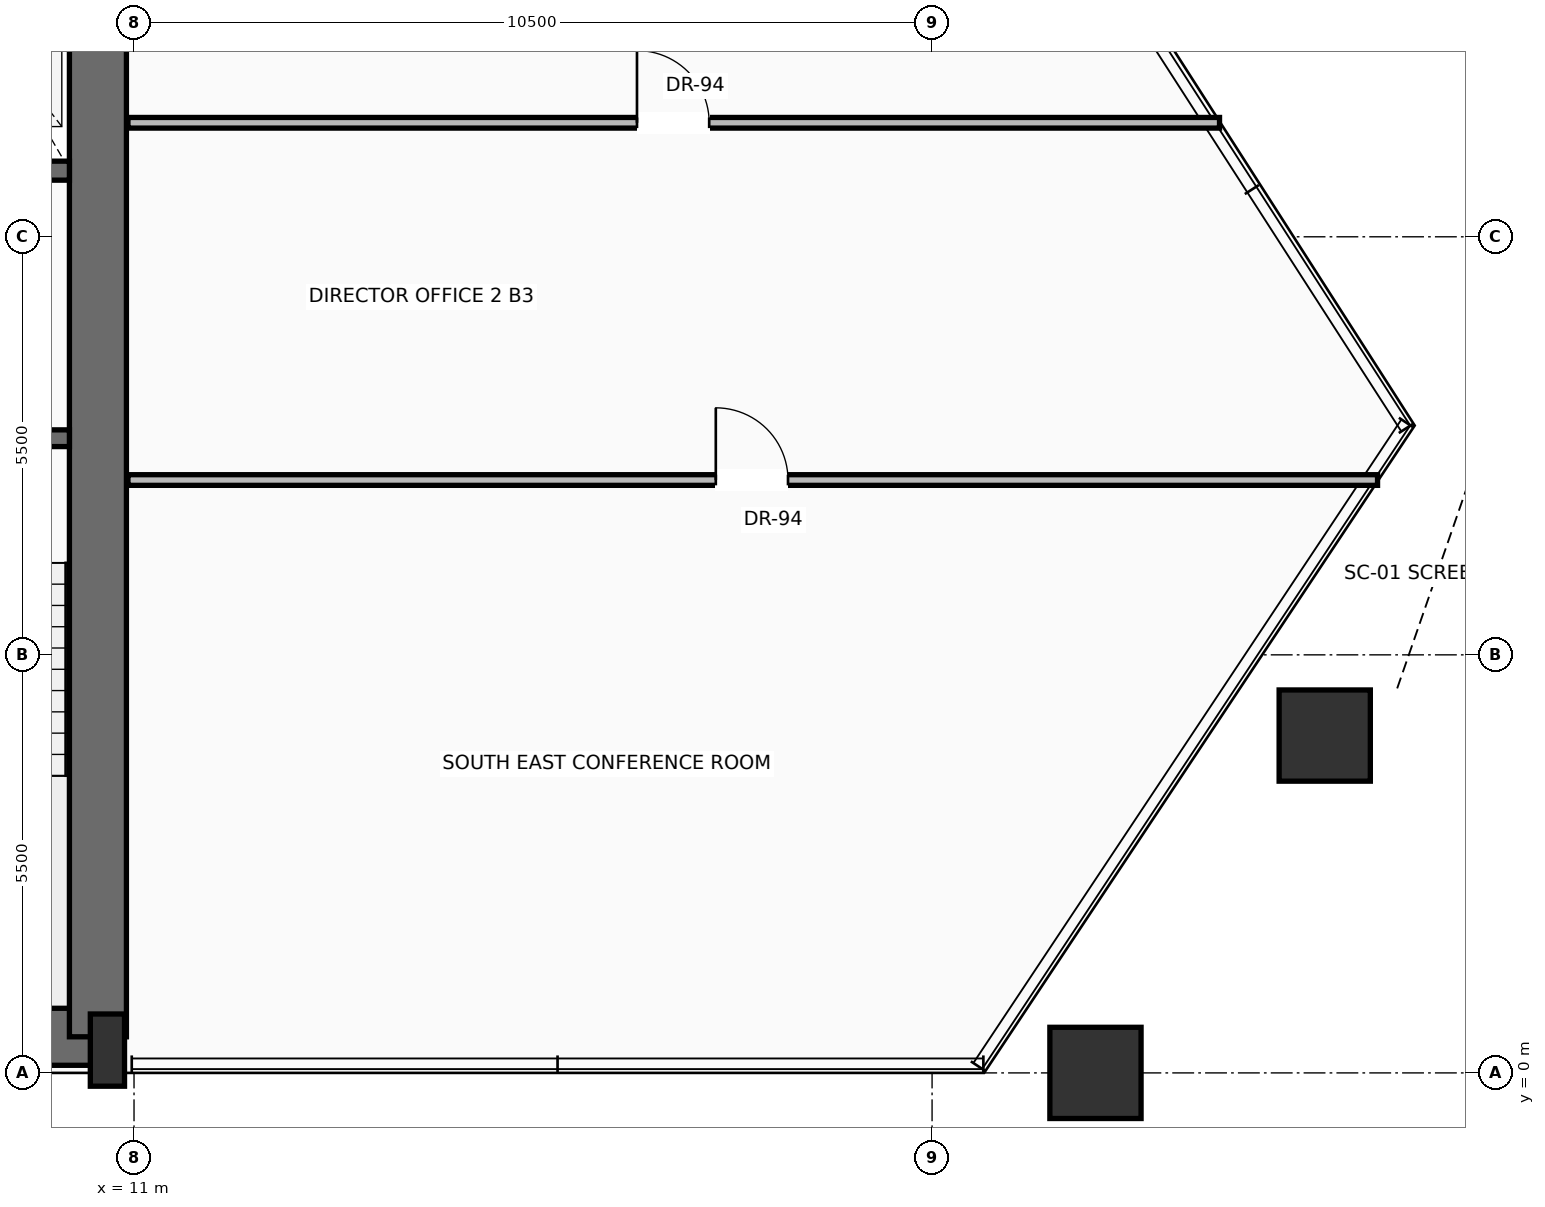
"""IFC4 building model, lengths in metres.
Left out: names, types, materials, properties, quantities, classifications, styles, units other than length and angle.
Written with IfcOpenShell. Run it as: python <this file> out.ifc"""

import sys

from ifc_helpers import new_model, si_unit, direction, frame, frame_2d, origin, origin_2d, place, context, subcontext, project, spatial, rectangle, hollow_rectangle, extrude, source, transform, mapped, element, fill, save


model = new_model("IFC4")
c1 = context("Model", 3, precision=1e-05, world=origin(), true_north=direction((0.0, 1.0)))
c2 = subcontext(c1, "Body", "Model", "MODEL_VIEW")
j1 = project(units=[si_unit("LENGTHUNIT", "METRE"), si_unit("PLANEANGLEUNIT", "RADIAN")], contexts=[c1])
p1 = place(None, origin())
s1 = spatial("IfcSite", under=j1, at=p1, CompositionType="ELEMENT")
p2 = place(p1, origin())
s2 = spatial("IfcBuilding", under=s1, at=p2, CompositionType="ELEMENT")
p3 = place(p2, frame((0.0, 0.0, 113.6)))
s3 = spatial("IfcBuildingStorey", under=s2, at=p3, CompositionType="ELEMENT", Elevation=113.6)
p4 = place(p3, frame((-10.65, 0.475, 0.0), z_axis=(0.0, 0.0, 1.0), x_axis=(1.0, 0.0, 0.0)))
e1 = element("IfcWall", 1, at=p4, inside=s3, PredefinedType="SHEAR", context=c2, shape_type="SweptSolid", body=[
    extrude(rectangle(XDim=21.3, YDim=0.75, at=frame_2d((10.65, 0.0))), origin(), (0.0, 0.0, 1.0), 3.45),
])
p5 = place(p3, frame((10.525, 0.475, 0.0), z_axis=(0.0, 0.0, 1.0), x_axis=(0.0, 1.0, 0.0)))
e2 = element("IfcWall", 2, at=p5, inside=s3, PredefinedType="SHEAR", context=c2, shape_type="SweptSolid", body=[
    extrude(rectangle(XDim=15.65, YDim=0.75, at=frame_2d((7.825, 0.0))), origin(), (0.0, 0.0, 1.0), 3.45),
])
m1 = source(origin(), c2, "Body", "SweptSolid", [
    extrude(rectangle(XDim=0.45, YDim=0.95, at=origin_2d()), origin(), (0.0, 0.0, 1.0), 3.7),
])
p6 = place(p3, frame((10.65, 0.3, 0.0), z_axis=(0.0, 0.0, 1.0), x_axis=(1.0, 0.0, 0.0)))
e3 = element("IfcColumn", 3, at=p6, inside=s3, PredefinedType="PILASTER", context=c2, shape_type="MappedRepresentation", body=[
    mapped(m1, transform((0.0, 0.0, 0.0), scale=1.0)),
])
m2 = source(origin(), c2, "Body", "SweptSolid", [
    extrude(hollow_rectangle(XDim=1.2, YDim=1.2, WallThickness=0.06, at=origin_2d()), origin(), (0.0, 0.0, 1.0), 3.691),
])
p7 = place(p3, frame((23.65, 0.0, 0.004), z_axis=(0.010648248709, 0.0, 0.999943305793), x_axis=(0.0, 1.0, 0.0)))
e4 = element("IfcColumn", 4, at=p7, inside=s3, PredefinedType="COLUMN", context=c2, shape_type="MappedRepresentation", body=[
    mapped(m2, transform((0.0, 0.0, 0.0), scale=1.0)),
])
m3 = source(origin(), c2, "Body", "SweptSolid", [
    extrude(hollow_rectangle(XDim=1.2, YDim=1.2, WallThickness=0.06, at=origin_2d()), origin(), (0.0, 0.0, 1.0), 3.692),
])
p8 = place(p3, frame((26.666, 4.438, 0.004), z_axis=(-0.001917877129, -0.015673685498, 0.999875320893), x_axis=(0.992596696584, -0.121456979751, 0.0)))
e5 = element("IfcColumn", 5, at=p8, inside=s3, PredefinedType="COLUMN", context=c2, shape_type="MappedRepresentation", body=[
    mapped(m3, transform((0.0, 0.0, 0.0), scale=1.0)),
])
p9 = place(p3, frame((10.15, 8.35, 0.0), z_axis=(0.0, 0.0, 1.0), x_axis=(-1.0, 0.0, 0.0)))
e6 = element("IfcWall", 6, at=p9, inside=s3, PredefinedType="SOLIDWALL", context=c2, shape_type="SweptSolid", body=[
    extrude(rectangle(XDim=4.65, YDim=0.22, at=frame_2d((2.325, 0.0))), origin(), (0.0, 0.0, 1.0), 3.45),
])
p10 = place(p9, frame((1.0, 0.0, 0.0)))
e7 = element("IfcOpeningElement", 7, at=p10, cuts=e6, PredefinedType="OPENING", context=c2, shape_type="SweptSolid", body=[
    extrude(rectangle(XDim=1.15, YDim=2.2, at=frame_2d((0.575, 1.1))), frame((0.0, 0.12, 0.0), z_axis=(0.0, -1.0, 0.0), x_axis=(1.0, 0.0, 0.0)), (0.0, 0.0, 1.0), 0.24),
])
p11 = place(p3, frame((10.15, 11.87, 0.0), z_axis=(0.0, 0.0, 1.0), x_axis=(-1.0, 0.0, 0.0)))
e8 = element("IfcWall", 8, at=p11, inside=s3, PredefinedType="SOLIDWALL", context=c2, shape_type="SweptSolid", body=[
    extrude(rectangle(XDim=4.65, YDim=0.25, at=frame_2d((2.325, 0.0))), origin(), (0.0, 0.0, 1.0), 3.45),
])
p12 = place(p11, frame((0.5, 0.0, 0.0)))
e9 = element("IfcOpeningElement", 9, at=p12, cuts=e8, PredefinedType="OPENING", context=c2, shape_type="SweptSolid", body=[
    extrude(rectangle(XDim=1.2, YDim=2.25, at=frame_2d((0.6, 1.125))), frame((0.0, 0.135, 0.0), z_axis=(0.0, -1.0, 0.0), x_axis=(1.0, 0.0, 0.0)), (0.0, 0.0, 1.0), 0.27),
])
p13 = place(p3, frame((10.92, 7.8, 0.0), z_axis=(0.0, 0.0, 1.0), x_axis=(1.0, 0.0, 0.0)))
e10 = element("IfcWall", 10, at=p13, inside=s3, PredefinedType="PARTITIONING", context=c2, shape_type="SweptSolid", body=[
    extrude(rectangle(XDim=16.441, YDim=0.14, at=frame_2d((8.221, 0.0))), origin(), (0.0, 0.0, 1.0), 3.442),
])
p14 = place(p13, frame((7.735, 0.0, 0.0)))
e11 = element("IfcOpeningElement", 11, at=p14, cuts=e10, PredefinedType="OPENING", context=c2, shape_type="SweptSolid", body=[
    extrude(rectangle(XDim=0.95, YDim=2.2, at=frame_2d((0.475, 1.1))), frame((0.0, 0.08, 0.0), z_axis=(0.0, -1.0, 0.0), x_axis=(1.0, 0.0, 0.0)), (0.0, 0.0, 1.0), 0.16),
])
p15 = place(p3, frame((10.92, 12.5, 0.0), z_axis=(0.0, 0.0, 1.0), x_axis=(1.0, 0.0, 0.0)))
e12 = element("IfcWall", 12, at=p15, inside=s3, PredefinedType="PARTITIONING", context=c2, shape_type="SweptSolid", body=[
    extrude(rectangle(XDim=14.362, YDim=0.14, at=frame_2d((7.181, 0.0))), origin(), (0.0, 0.0, 1.0), 3.442),
])
p16 = place(p15, frame((6.698, 0.0, 0.0)))
e13 = element("IfcOpeningElement", 13, at=p16, cuts=e12, PredefinedType="OPENING", context=c2, shape_type="SweptSolid", body=[
    extrude(rectangle(XDim=0.95, YDim=2.2, at=frame_2d((0.475, 1.1))), frame((0.0, 0.08, 0.0), z_axis=(0.0, -1.0, 0.0), x_axis=(1.0, 0.0, 0.0)), (0.0, 0.0, 1.0), 0.16),
])
m4 = source(origin(), c2, "Body", "SweptSolid", [
    extrude(rectangle(XDim=0.95, YDim=2.2, at=frame_2d((0.475, 1.1))), frame((0.0, 0.025, 0.0), z_axis=(0.0, -1.0, 0.0), x_axis=(1.0, 0.0, 0.0)), (0.0, 0.0, 1.0), 0.05),
])
p17 = place(p16, origin())
e14 = element("IfcDoor", 14, at=p17, inside=s3, OperationType="SINGLE_SWING_LEFT", PredefinedType="DOOR", context=c2, shape_type="MappedRepresentation", body=[
    mapped(m4, transform((0.0, 0.0, 0.0), scale=1.0)),
])
fill(e13, e14)
p18 = place(p14, origin())
e15 = element("IfcDoor", 15, at=p18, inside=s3, OperationType="SINGLE_SWING_LEFT", PredefinedType="DOOR", context=c2, shape_type="MappedRepresentation", body=[
    mapped(m4, transform((0.0, 0.0, 0.0), scale=1.0)),
])
fill(e11, e15)
save(model, sys.argv[1])
